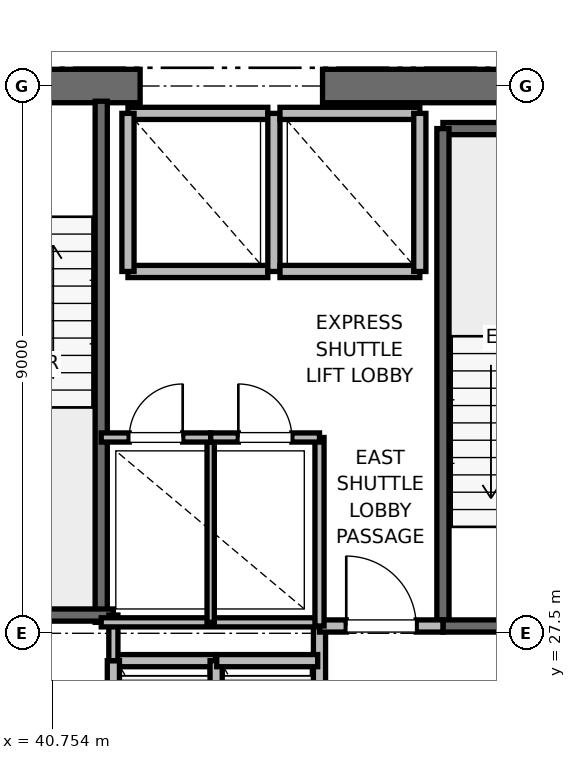
"""IFC4 building model, lengths in metres.
Left out: names, types, materials, properties, quantities, classifications, styles, units other than length and angle.
Written with IfcOpenShell. Run it as: python <this file> out.ifc"""

import sys

from ifc_helpers import new_model, si_unit, direction, frame, frame_2d, origin, place, context, subcontext, project, spatial, rectangle, extrude, element, fill, save


model = new_model("IFC4")
c1 = context("Model", 3, precision=1e-05, world=origin(), true_north=direction((0.0, 1.0)))
c2 = subcontext(c1, "Body", "Model", "MODEL_VIEW")
j1 = project(units=[si_unit("LENGTHUNIT", "METRE"), si_unit("PLANEANGLEUNIT", "RADIAN")], contexts=[c1])
p1 = place(None, origin())
s1 = spatial("IfcSite", under=j1, at=p1, CompositionType="ELEMENT")
p2 = place(p1, origin())
s2 = spatial("IfcBuilding", under=s1, at=p2, CompositionType="ELEMENT")
p3 = place(p2, frame((0.0, 0.0, 144.4)))
s3 = spatial("IfcBuildingStorey", under=s2, at=p3, CompositionType="ELEMENT", Elevation=144.4)
p4 = place(p3, frame((37.8, 36.5, 0.0), z_axis=(0.0, 0.0, 1.0), x_axis=(1.0, 0.0, 0.0)))
e1 = element("IfcWall", 1, at=p4, inside=s3, PredefinedType="SHEAR", context=c2, shape_type="SweptSolid", body=[
    extrude(rectangle(XDim=4.4, YDim=0.55, at=frame_2d((2.2, 0.0))), origin(), (0.0, 0.0, 1.0), 3.775),
])
p5 = place(p4, frame((1.65, 0.0, 0.0)))
e2 = element("IfcOpeningElement", 2, at=p5, cuts=e1, PredefinedType="OPENING", context=c2, shape_type="SweptSolid", body=[
    extrude(rectangle(XDim=1.1, YDim=2.15, at=frame_2d((0.55, 1.075))), frame((0.0, 0.275, 0.0), z_axis=(0.0, -1.0, 0.0), x_axis=(1.0, 0.0, 0.0)), (0.0, 0.0, 1.0), 0.55),
])
p6 = place(p3, frame((45.2, 36.5, 0.0), z_axis=(0.0, 0.0, 1.0), x_axis=(1.0, 0.0, 0.0)))
e3 = element("IfcWall", 3, at=p6, inside=s3, PredefinedType="SHEAR", context=c2, shape_type="SweptSolid", body=[
    extrude(rectangle(XDim=5.8, YDim=0.55, at=frame_2d((2.9, 0.0))), origin(), (0.0, 0.0, 1.0), 3.775),
])
p7 = place(p3, frame((47.18, 35.8, 0.0), z_axis=(0.0, 0.0, 1.0), x_axis=(1.0, 0.0, 0.0)))
e4 = element("IfcWall", 4, at=p7, inside=s3, PredefinedType="SOLIDWALL", context=c2, shape_type="SweptSolid", body=[
    extrude(rectangle(XDim=3.12, YDim=0.2, at=frame_2d((1.56, 0.0))), origin(), (0.0, 0.0, 1.0), 3.775),
])
p8 = place(p3, frame((47.18, 27.62, 0.0), z_axis=(0.0, 0.0, 1.0), x_axis=(0.0, 1.0, 0.0)))
e5 = element("IfcWall", 5, at=p8, inside=s3, PredefinedType="SOLIDWALL", context=c2, shape_type="SweptSolid", body=[
    extrude(rectangle(XDim=8.18, YDim=0.2, at=frame_2d((4.09, 0.0))), origin(), (0.0, 0.0, 1.0), 3.775),
])
p9 = place(p3, frame((47.18, 27.62, 0.0), z_axis=(0.0, 0.0, 1.0), x_axis=(1.0, 0.0, 0.0)))
e6 = element("IfcWall", 6, at=p9, inside=s3, PredefinedType="SOLIDWALL", context=c2, shape_type="SweptSolid", body=[
    extrude(rectangle(XDim=3.12, YDim=0.2, at=frame_2d((1.56, 0.0))), origin(), (0.0, 0.0, 1.0), 3.775),
])
p10 = place(p9, frame((1.01, 0.0, 0.0)))
e7 = element("IfcOpeningElement", 7, at=p10, cuts=e6, PredefinedType="OPENING", context=c2, shape_type="SweptSolid", body=[
    extrude(rectangle(XDim=1.1, YDim=2.15, at=frame_2d((0.55, 1.075))), frame((0.0, 0.1, 0.0), z_axis=(0.0, -1.0, 0.0), x_axis=(1.0, 0.0, 0.0)), (0.0, 0.0, 1.0), 0.2),
])
p11 = place(p3, frame((41.56, 27.68, 0.0), z_axis=(0.0, 0.0, 1.0), x_axis=(0.0, 1.0, 0.0)))
e8 = element("IfcWall", 8, at=p11, inside=s3, PredefinedType="SOLIDWALL", context=c2, shape_type="SweptSolid", body=[
    extrude(rectangle(XDim=8.57, YDim=0.2, at=frame_2d((4.285, 0.0))), origin(), (0.0, 0.0, 1.0), 3.775),
])
p12 = place(p3, frame((38.44, 27.8, 0.0), z_axis=(0.0, 0.0, 1.0), x_axis=(1.0, 0.0, 0.0)))
e9 = element("IfcWall", 9, at=p12, inside=s3, PredefinedType="SOLIDWALL", context=c2, shape_type="SweptSolid", body=[
    extrude(rectangle(XDim=3.32, YDim=0.2, at=frame_2d((1.66, 0.0))), origin(), (0.0, 0.0, 1.0), 3.775),
])
p13 = place(p3, frame((45.15, 24.25, 0.0), z_axis=(0.0, 0.0, 1.0), x_axis=(0.0, 1.0, 0.0)))
e10 = element("IfcWall", 10, at=p13, inside=s3, PredefinedType="PARTITIONING", context=c2, shape_type="SweptSolid", body=[
    extrude(rectangle(XDim=3.37, YDim=0.2, at=frame_2d((1.685, 0.0))), origin(), (0.0, 0.0, 1.0), 3.775),
])
p14 = place(p3, frame((45.15, 27.62, 0.0), z_axis=(0.0, 0.0, 1.0), x_axis=(1.0, 0.0, 0.0)))
e11 = element("IfcWall", 11, at=p14, inside=s3, PredefinedType="PARTITIONING", context=c2, shape_type="SweptSolid", body=[
    extrude(rectangle(XDim=2.03, YDim=0.2, at=frame_2d((1.015, 0.0))), origin(), (0.0, 0.0, 1.0), 3.775),
])
p15 = place(p14, frame((0.44, 0.0, 0.0)))
e12 = element("IfcOpeningElement", 12, at=p15, cuts=e11, PredefinedType="OPENING", context=c2, shape_type="SweptSolid", body=[
    extrude(rectangle(XDim=1.15, YDim=2.2, at=frame_2d((0.575, 1.1))), frame((0.0, 0.1, 0.0), z_axis=(0.0, -1.0, 0.0), x_axis=(1.0, 0.0, 0.0)), (0.0, 0.0, 1.0), 0.2),
])
p16 = place(p3, frame((43.44, 27.05, 0.0), z_axis=(0.0, 0.0, 1.0), x_axis=(-1.0, 0.0, 0.0)))
e13 = element("IfcWall", 13, at=p16, inside=s3, PredefinedType="SOLIDWALL", context=c2, shape_type="SweptSolid", body=[
    extrude(rectangle(XDim=1.68, YDim=0.2, at=frame_2d((0.84, 0.0))), origin(), (0.0, 0.0, 1.0), 3.775),
])
for number, where, z_axis, x_axis in (
    (14, (41.76, 27.05, 0.0), (0.0, 0.0, 1.0), (0.0, -1.0, 0.0)),
    (15, (43.45, 24.45, 0.0), (0.0, 0.0, 1.0), (0.0, 1.0, 0.0)),
):
    element("IfcWall", number, at=place(p3, frame(where, z_axis=z_axis, x_axis=x_axis)), inside=s3, PredefinedType="SOLIDWALL", context=c2, shape_type="SweptSolid", body=[
        extrude(rectangle(XDim=2.6, YDim=0.2, at=frame_2d((1.3, 0.0))), origin(), (0.0, 0.0, 1.0), 3.775),
    ])
p17 = place(p3, frame((45.12, 27.05, 0.0), z_axis=(0.0, 0.0, 1.0), x_axis=(-1.0, 0.0, 0.0)))
e16 = element("IfcWall", 16, at=p17, inside=s3, PredefinedType="SOLIDWALL", context=c2, shape_type="SweptSolid", body=[
    extrude(rectangle(XDim=1.66, YDim=0.2, at=frame_2d((0.83, 0.0))), origin(), (0.0, 0.0, 1.0), 3.775),
])
p18 = place(p3, frame((42.0, 33.45, 0.0), z_axis=(0.0, 0.0, 1.0), x_axis=(1.0, 0.0, 0.0)))
e17 = element("IfcWall", 17, at=p18, inside=s3, PredefinedType="SOLIDWALL", context=c2, shape_type="SweptSolid", body=[
    extrude(rectangle(XDim=2.3, YDim=0.2, at=frame_2d((1.15, 0.0))), origin(), (0.0, 0.0, 1.0), 3.775),
])
p19 = place(p3, frame((44.3, 36.05, 0.0), z_axis=(0.0, 0.0, 1.0), x_axis=(-1.0, 0.0, 0.0)))
e18 = element("IfcWall", 18, at=p19, inside=s3, PredefinedType="SOLIDWALL", context=c2, shape_type="SweptSolid", body=[
    extrude(rectangle(XDim=2.3, YDim=0.2, at=frame_2d((1.15, 0.0))), origin(), (0.0, 0.0, 1.0), 2.755),
])
for number, where, z_axis, x_axis in (
    (19, (42.0, 36.05, 0.0), (0.0, 0.0, 1.0), (0.0, -1.0, 0.0)),
    (20, (44.4, 33.45, 0.0), (0.0, 0.0, 1.0), (0.0, 1.0, 0.0)),
):
    element("IfcWall", number, at=place(p3, frame(where, z_axis=z_axis, x_axis=x_axis)), inside=s3, PredefinedType="SOLIDWALL", context=c2, shape_type="SweptSolid", body=[
        extrude(rectangle(XDim=2.6, YDim=0.2, at=frame_2d((1.3, 0.0))), origin(), (0.0, 0.0, 1.0), 2.755),
    ])
p20 = place(p3, frame((44.5, 33.45, 0.0), z_axis=(0.0, 0.0, 1.0), x_axis=(1.0, 0.0, 0.0)))
e21 = element("IfcWall", 21, at=p20, inside=s3, PredefinedType="SOLIDWALL", context=c2, shape_type="SweptSolid", body=[
    extrude(rectangle(XDim=2.3, YDim=0.2, at=frame_2d((1.15, 0.0))), origin(), (0.0, 0.0, 1.0), 3.775),
])
p21 = place(p3, frame((46.8, 36.05, 0.0), z_axis=(0.0, 0.0, 1.0), x_axis=(-1.0, 0.0, 0.0)))
e22 = element("IfcWall", 22, at=p21, inside=s3, PredefinedType="SOLIDWALL", context=c2, shape_type="SweptSolid", body=[
    extrude(rectangle(XDim=2.3, YDim=0.2, at=frame_2d((1.15, 0.0))), origin(), (0.0, 0.0, 1.0), 2.755),
])
p22 = place(p3, frame((46.8, 33.45, 0.0), z_axis=(0.0, 0.0, 1.0), x_axis=(0.0, 1.0, 0.0)))
e23 = element("IfcWall", 23, at=p22, inside=s3, PredefinedType="SOLIDWALL", context=c2, shape_type="SweptSolid", body=[
    extrude(rectangle(XDim=2.6, YDim=0.2, at=frame_2d((1.3, 0.0))), origin(), (0.0, 0.0, 1.0), 3.775),
])
p23 = place(p3, frame((41.76, 27.05, 0.0), z_axis=(0.0, 0.0, 1.0), x_axis=(0.0, 1.0, 0.0)))
e24 = element("IfcWall", 24, at=p23, inside=s3, PredefinedType="PARTITIONING", context=c2, shape_type="SweptSolid", body=[
    extrude(rectangle(XDim=0.75, YDim=0.15, at=frame_2d((0.375, 0.0))), origin(), (0.0, 0.0, 1.0), 2.85),
])
p24 = place(p3, frame((41.56, 27.68, 0.0), z_axis=(0.0, 0.0, 1.0), x_axis=(1.0, 0.0, 0.0)))
e25 = element("IfcWall", 25, at=p24, inside=s3, PredefinedType="PARTITIONING", context=c2, shape_type="SweptSolid", body=[
    extrude(rectangle(XDim=3.59, YDim=0.15, at=frame_2d((1.795, 0.0))), origin(), (0.0, 0.0, 1.0), 2.85),
])
p25 = place(p3, frame((45.15, 27.62, 0.0), z_axis=(0.0, 0.0, 1.0), x_axis=(0.0, 1.0, 0.0)))
e26 = element("IfcWall", 26, at=p25, inside=s3, PredefinedType="PARTITIONING", context=c2, shape_type="SweptSolid", body=[
    extrude(rectangle(XDim=3.1, YDim=0.15, at=frame_2d((1.55, 0.0))), origin(), (0.0, 0.0, 1.0), 2.85),
])
p26 = place(p3, frame((43.36, 27.68, 0.0), z_axis=(0.0, 0.0, 1.0), x_axis=(0.0, 1.0, 0.0)))
e27 = element("IfcWall", 27, at=p26, inside=s3, PredefinedType="PARTITIONING", context=c2, shape_type="SweptSolid", body=[
    extrude(rectangle(XDim=3.04, YDim=0.12, at=frame_2d((1.52, 0.0))), origin(), (0.0, 0.0, 1.0), 2.85),
])
p27 = place(p3, frame((41.56, 30.72, 0.0), z_axis=(0.0, 0.0, 1.0), x_axis=(1.0, 0.0, 0.0)))
e28 = element("IfcWall", 28, at=p27, inside=s3, PredefinedType="PARTITIONING", context=c2, shape_type="SweptSolid", body=[
    extrude(rectangle(XDim=1.8, YDim=0.15, at=frame_2d((0.9, 0.0))), origin(), (0.0, 0.0, 1.0), 2.85),
])
p28 = place(p27, frame((0.46, 0.0, 0.0)))
e29 = element("IfcOpeningElement", 29, at=p28, cuts=e28, PredefinedType="OPENING", context=c2, shape_type="SweptSolid", body=[
    extrude(rectangle(XDim=0.88, YDim=2.1, at=frame_2d((0.44, 1.05))), frame((0.0, 0.075, 0.0), z_axis=(0.0, -1.0, 0.0), x_axis=(1.0, 0.0, 0.0)), (0.0, 0.0, 1.0), 0.15),
])
p29 = place(p3, frame((43.36, 30.72, 0.0), z_axis=(0.0, 0.0, 1.0), x_axis=(1.0, 0.0, 0.0)))
e30 = element("IfcWall", 30, at=p29, inside=s3, PredefinedType="PARTITIONING", context=c2, shape_type="SweptSolid", body=[
    extrude(rectangle(XDim=1.79, YDim=0.15, at=frame_2d((0.895, 0.0))), origin(), (0.0, 0.0, 1.0), 2.85),
])
p30 = place(p29, frame((0.455, 0.0, 0.0)))
e31 = element("IfcOpeningElement", 31, at=p30, cuts=e30, PredefinedType="OPENING", context=c2, shape_type="SweptSolid", body=[
    extrude(rectangle(XDim=0.88, YDim=2.1, at=frame_2d((0.44, 1.05))), frame((0.0, 0.075, 0.0), z_axis=(0.0, -1.0, 0.0), x_axis=(1.0, 0.0, 0.0)), (0.0, 0.0, 1.0), 0.15),
])
p31 = place(p15, origin())
e32 = element("IfcDoor", 32, at=p31, inside=s3, OperationType="SINGLE_SWING_LEFT", PredefinedType="DOOR", context=c2, shape_type="SweptSolid", body=[
    extrude(rectangle(XDim=1.15, YDim=2.2, at=frame_2d((0.575, 1.1))), frame((0.0, 0.025, 0.0), z_axis=(0.0, -1.0, 0.0), x_axis=(1.0, 0.0, 0.0)), (0.0, 0.0, 1.0), 0.05),
])
fill(e12, e32)
p32 = place(p28, origin())
e33 = element("IfcDoor", 33, at=p32, inside=s3, OperationType="SINGLE_SWING_RIGHT", PredefinedType="DOOR", context=c2, shape_type="SweptSolid", body=[
    extrude(rectangle(XDim=0.88, YDim=2.1, at=frame_2d((0.44, 1.05))), frame((0.0, 0.025, 0.0), z_axis=(0.0, -1.0, 0.0), x_axis=(1.0, 0.0, 0.0)), (0.0, 0.0, 1.0), 0.05),
])
fill(e29, e33)
p33 = place(p30, origin())
e34 = element("IfcDoor", 34, at=p33, inside=s3, OperationType="SINGLE_SWING_LEFT", PredefinedType="DOOR", context=c2, shape_type="SweptSolid", body=[
    extrude(rectangle(XDim=0.88, YDim=2.1, at=frame_2d((0.44, 1.05))), frame((0.0, 0.025, 0.0), z_axis=(0.0, -1.0, 0.0), x_axis=(1.0, 0.0, 0.0)), (0.0, 0.0, 1.0), 0.05),
])
fill(e31, e34)
save(model, sys.argv[1])
